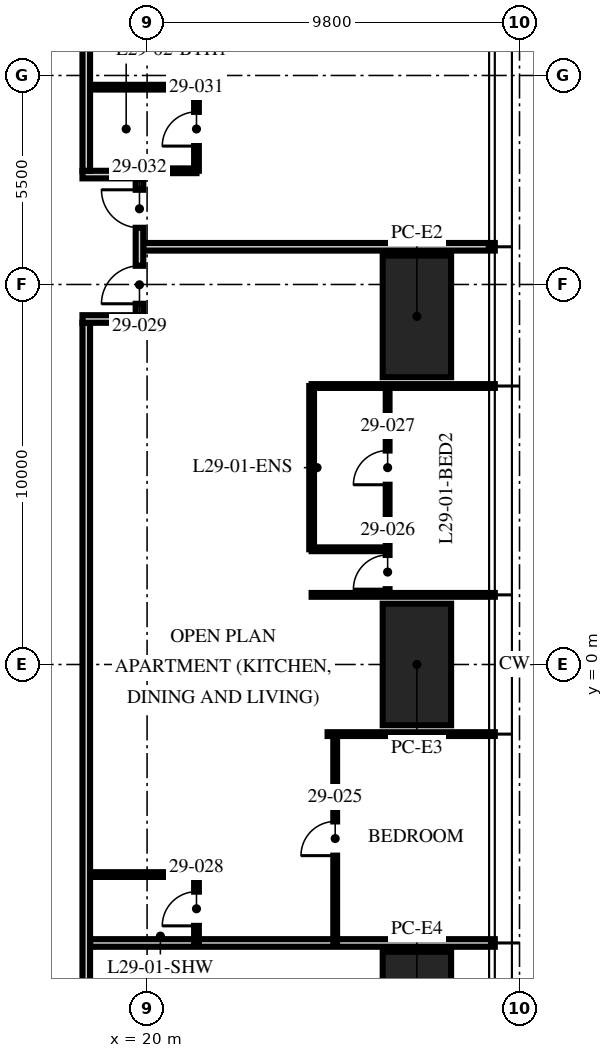
"""IFC4 building model, lengths in metres.
Left out: names, types, materials, properties, quantities, classifications, styles, units other than length and angle.
Written with IfcOpenShell. Run it as: python <this file> out.ifc"""

import sys

from ifc_helpers import new_model, si_unit, direction, frame, frame_2d, origin, origin_2d, place, context, subcontext, project, spatial, rectangle, hollow_rectangle, extrude, element, fill, save


model = new_model("IFC4")
c1 = context("Model", 3, precision=1e-05, world=origin(), true_north=direction((0.0, 1.0)))
c2 = subcontext(c1, "Body", "Model", "MODEL_VIEW")
j1 = project(units=[si_unit("LENGTHUNIT", "METRE"), si_unit("PLANEANGLEUNIT", "RADIAN")], contexts=[c1])
p1 = place(None, origin())
s1 = spatial("IfcSite", under=j1, at=p1, CompositionType="ELEMENT")
p2 = place(p1, origin())
s2 = spatial("IfcBuilding", under=s1, at=p2, CompositionType="ELEMENT")
p3 = place(p2, frame((0.0, 0.0, 118.5)))
s3 = spatial("IfcBuildingStorey", under=s2, at=p3, CompositionType="ELEMENT", Elevation=118.5)
for number, where, z_axis, x_axis in (
    (1, (27.1, 9.16, 0.0), (0.0, 0.0, 1.0), (0.0, 1.0, 0.0)),
    (2, (27.1, 0.0, 0.0), (0.0, 0.0, 1.0), (0.0, 1.0, 0.0)),
    (3, (27.1, -9.16, 0.0), (0.0, 0.0, 1.0), (0.0, 1.0, 0.0)),
):
    element("IfcColumn", number, at=place(p3, frame(where, z_axis=z_axis, x_axis=x_axis)), inside=s3, PredefinedType="COLUMN", context=c2, shape_type="SweptSolid", body=[
        extrude(hollow_rectangle(XDim=3.2, YDim=1.8, WallThickness=0.2, at=origin_2d()), origin(), (0.0, 0.0, 1.0), 3.75),
    ])
p4 = place(p3, frame((18.5, -7.328, 0.0), z_axis=(0.0, 0.0, 1.0), x_axis=(1.0, 0.0, 0.0)))
e4 = element("IfcWall", 4, at=p4, inside=s3, PredefinedType="PARTITIONING", context=c2, shape_type="SweptSolid", body=[
    extrude(rectangle(XDim=10.65, YDim=0.2, at=frame_2d((5.325, 0.0))), origin(), (0.0, 0.0, 1.0), 2.81),
])
p5 = place(p3, frame((24.75, -1.832, 0.0), z_axis=(0.0, 0.0, 1.0), x_axis=(1.0, 0.0, 0.0)))
e5 = element("IfcWall", 5, at=p5, inside=s3, PredefinedType="PARTITIONING", context=c2, shape_type="SweptSolid", body=[
    extrude(rectangle(XDim=4.4, YDim=0.1, at=frame_2d((2.2, 0.0))), origin(), (0.0, 0.0, 1.0), 2.81),
])
for number, where, z_axis, x_axis in (
    (6, (24.33, 1.832, 0.0), (0.0, 0.0, 1.0), (1.0, 0.0, 0.0)),
    (7, (24.33, 7.328, 0.0), (0.0, 0.0, 1.0), (1.0, 0.0, 0.0)),
):
    element("IfcWall", number, at=place(p3, frame(where, z_axis=z_axis, x_axis=x_axis)), inside=s3, PredefinedType="PARTITIONING", context=c2, shape_type="SweptSolid", body=[
        extrude(rectangle(XDim=4.82, YDim=0.1, at=frame_2d((2.41, 0.0))), origin(), (0.0, 0.0, 1.0), 2.81),
    ])
p6 = place(p3, frame((19.9, 10.992, 0.0), z_axis=(0.0, 0.0, 1.0), x_axis=(1.0, 0.0, 0.0)))
e8 = element("IfcWall", 8, at=p6, inside=s3, PredefinedType="PARTITIONING", context=c2, shape_type="SweptSolid", body=[
    extrude(rectangle(XDim=9.25, YDim=0.2, at=frame_2d((4.625, 0.0))), origin(), (0.0, 0.0, 1.0), 2.81),
])
p7 = place(p3, frame((24.95, -7.328, 0.0), z_axis=(0.0, 0.0, 1.0), x_axis=(0.0, 1.0, 0.0)))
e9 = element("IfcWall", 9, at=p7, inside=s3, PredefinedType="PARTITIONING", context=c2, shape_type="SweptSolid", body=[
    extrude(rectangle(XDim=5.496, YDim=0.1, at=frame_2d((2.748, 0.0))), origin(), (0.0, 0.0, 1.0), 2.81),
])
p8 = place(p7, frame((2.298, 0.0, 0.0)))
e10 = element("IfcOpeningElement", 10, at=p8, cuts=e9, PredefinedType="OPENING", context=c2, shape_type="SweptSolid", body=[
    extrude(rectangle(XDim=0.9, YDim=2.1, at=frame_2d((0.45, 1.05))), frame((0.0, 0.06, 0.0), z_axis=(0.0, -1.0, 0.0), x_axis=(1.0, 0.0, 0.0)), (0.0, 0.0, 1.0), 0.12),
])
p9 = place(p3, frame((26.33, 1.832, 0.0), z_axis=(0.0, 0.0, 1.0), x_axis=(0.0, 1.0, 0.0)))
e11 = element("IfcWall", 11, at=p9, inside=s3, PredefinedType="PARTITIONING", context=c2, shape_type="SweptSolid", body=[
    extrude(rectangle(XDim=5.496, YDim=0.1, at=frame_2d((2.748, 0.0))), origin(), (0.0, 0.0, 1.0), 2.81),
])
p10 = place(p9, frame((0.15, 0.0, 0.0)))
e12 = element("IfcOpeningElement", 12, at=p10, cuts=e11, PredefinedType="OPENING", context=c2, shape_type="SweptSolid", body=[
    extrude(rectangle(XDim=0.9, YDim=2.1, at=frame_2d((0.45, 1.05))), frame((0.0, 0.06, 0.0), z_axis=(0.0, -1.0, 0.0), x_axis=(1.0, 0.0, 0.0)), (0.0, 0.0, 1.0), 0.12),
])
p11 = place(p9, frame((2.898, 0.0, 0.0)))
e13 = element("IfcOpeningElement", 13, at=p11, cuts=e11, PredefinedType="OPENING", context=c2, shape_type="SweptSolid", body=[
    extrude(rectangle(XDim=0.9, YDim=2.1, at=frame_2d((0.45, 1.05))), frame((0.0, 0.06, 0.0), z_axis=(0.0, -1.0, 0.0), x_axis=(1.0, 0.0, 0.0)), (0.0, 0.0, 1.0), 0.12),
])
p12 = place(p3, frame((24.33, 3.032, 0.0), z_axis=(0.0, 0.0, 1.0), x_axis=(1.0, 0.0, 0.0)))
e14 = element("IfcWall", 14, at=p12, inside=s3, PredefinedType="PARTITIONING", context=c2, shape_type="SweptSolid", body=[
    extrude(rectangle(XDim=2.0, YDim=0.1, at=frame_2d((1.0, 0.0))), origin(), (0.0, 0.0, 1.0), 3.5),
])
p13 = place(p3, frame((24.33, 3.032, 0.0), z_axis=(0.0, 0.0, 1.0), x_axis=(0.0, 1.0, 0.0)))
e15 = element("IfcWall", 15, at=p13, inside=s3, PredefinedType="PARTITIONING", context=c2, shape_type="SweptSolid", body=[
    extrude(rectangle(XDim=4.296, YDim=0.125, at=frame_2d((2.148, 0.0))), origin(), (0.0, 0.0, 1.0), 2.81),
])
p14 = place(p3, frame((21.3, -7.328, 0.0), z_axis=(0.0, 0.0, 1.0), x_axis=(0.0, 1.0, 0.0)))
e16 = element("IfcWall", 16, at=p14, inside=s3, PredefinedType="PARTITIONING", context=c2, shape_type="SweptSolid", body=[
    extrude(rectangle(XDim=1.8, YDim=0.125, at=frame_2d((0.9, 0.0))), origin(), (0.0, 0.0, 1.0), 3.5),
])
p15 = place(p14, frame((0.45, 0.0, 0.0)))
e17 = element("IfcOpeningElement", 17, at=p15, cuts=e16, PredefinedType="OPENING", context=c2, shape_type="SweptSolid", body=[
    extrude(rectangle(XDim=0.9, YDim=2.1, at=frame_2d((0.45, 1.05))), frame((0.0, 0.073, 0.0), z_axis=(0.0, -1.0, 0.0), x_axis=(1.0, 0.0, 0.0)), (0.0, 0.0, 1.0), 0.145),
])
p16 = place(p3, frame((18.5, -5.528, 0.0), z_axis=(0.0, 0.0, 1.0), x_axis=(1.0, 0.0, 0.0)))
e18 = element("IfcWall", 18, at=p16, inside=s3, PredefinedType="PARTITIONING", context=c2, shape_type="SweptSolid", body=[
    extrude(rectangle(XDim=2.8, YDim=0.125, at=frame_2d((1.4, 0.0))), origin(), (0.0, 0.0, 1.0), 3.5),
])
p17 = place(p3, frame((21.3, 12.992, 0.0), z_axis=(0.0, 0.0, 1.0), x_axis=(0.0, 1.0, 0.0)))
e19 = element("IfcWall", 19, at=p17, inside=s3, PredefinedType="PARTITIONING", context=c2, shape_type="SweptSolid", body=[
    extrude(rectangle(XDim=2.2, YDim=0.125, at=frame_2d((1.1, 0.0))), origin(), (0.0, 0.0, 1.0), 2.81),
])
p18 = place(p17, frame((0.65, 0.0, 0.0)))
e20 = element("IfcOpeningElement", 20, at=p18, cuts=e19, PredefinedType="OPENING", context=c2, shape_type="SweptSolid", body=[
    extrude(rectangle(XDim=0.9, YDim=2.1, at=frame_2d((0.45, 1.05))), frame((0.0, 0.073, 0.0), z_axis=(0.0, -1.0, 0.0), x_axis=(1.0, 0.0, 0.0)), (0.0, 0.0, 1.0), 0.145),
])
p19 = place(p3, frame((19.97, 12.992, 0.0), z_axis=(0.0, 0.0, 1.0), x_axis=(1.0, 0.0, 0.0)))
e21 = element("IfcWall", 21, at=p19, inside=s3, PredefinedType="PARTITIONING", context=c2, shape_type="SweptSolid", body=[
    extrude(rectangle(XDim=1.33, YDim=0.125, at=frame_2d((0.665, 0.0))), origin(), (0.0, 0.0, 1.0), 3.5),
])
p20 = place(p3, frame((18.5, 15.192, 0.0), z_axis=(0.0, 0.0, 1.0), x_axis=(1.0, 0.0, 0.0)))
e22 = element("IfcWall", 22, at=p20, inside=s3, PredefinedType="PARTITIONING", context=c2, shape_type="SweptSolid", body=[
    extrude(rectangle(XDim=2.8, YDim=0.125, at=frame_2d((1.4, 0.0))), origin(), (0.0, 0.0, 1.0), 3.5),
])
p21 = place(p3, frame((18.4, -18.3, 0.0), z_axis=(0.0, 0.0, 1.0), x_axis=(0.0, 1.0, 0.0)))
e23 = element("IfcWall", 23, at=p21, inside=s3, PredefinedType="PARTITIONING", context=c2, shape_type="SweptSolid", body=[
    extrude(rectangle(XDim=27.292, YDim=0.2, at=frame_2d((13.646, 0.0))), origin(), (0.0, 0.0, 1.0), 2.3),
])
p22 = place(p3, frame((18.3, 9.092, 0.0), z_axis=(0.0, 0.0, 1.0), x_axis=(1.0, 0.0, 0.0)))
e24 = element("IfcWall", 24, at=p22, inside=s3, PredefinedType="PARTITIONING", context=c2, shape_type="SweptSolid", body=[
    extrude(rectangle(XDim=1.6, YDim=0.2, at=frame_2d((0.8, 0.0))), origin(), (0.0, 0.0, 1.0), 2.7),
])
p23 = place(p3, frame((18.3, 12.892, 0.0), z_axis=(0.0, 0.0, 1.0), x_axis=(1.0, 0.0, 0.0)))
e25 = element("IfcWall", 25, at=p23, inside=s3, PredefinedType="PARTITIONING", context=c2, shape_type="SweptSolid", body=[
    extrude(rectangle(XDim=1.6, YDim=0.2, at=frame_2d((0.8, 0.0))), origin(), (0.0, 0.0, 1.0), 3.5),
])
p24 = place(p3, frame((19.8, 9.192, 0.0), z_axis=(0.0, 0.0, 1.0), x_axis=(0.0, 1.0, 0.0)))
e26 = element("IfcWall", 26, at=p24, inside=s3, PredefinedType="PARTITIONING", context=c2, shape_type="SweptSolid", body=[
    extrude(rectangle(XDim=3.6, YDim=0.2, at=frame_2d((1.8, 0.0))), origin(), (0.0, 0.0, 1.0), 2.7),
])
p25 = place(p24, frame((0.3, 0.0, 0.0)))
e27 = element("IfcOpeningElement", 27, at=p25, cuts=e26, PredefinedType="OPENING", context=c2, shape_type="SweptSolid", body=[
    extrude(rectangle(XDim=1.0, YDim=2.2, at=frame_2d((0.5, 1.1))), frame((0.0, 0.11, 0.0), z_axis=(0.0, -1.0, 0.0), x_axis=(1.0, 0.0, 0.0)), (0.0, 0.0, 1.0), 0.22),
])
p26 = place(p24, frame((2.3, 0.0, 0.0)))
e28 = element("IfcOpeningElement", 28, at=p26, cuts=e26, PredefinedType="OPENING", context=c2, shape_type="SweptSolid", body=[
    extrude(rectangle(XDim=1.0, YDim=2.2, at=frame_2d((0.5, 1.1))), frame((0.0, 0.11, 0.0), z_axis=(0.0, -1.0, 0.0), x_axis=(1.0, 0.0, 0.0)), (0.0, 0.0, 1.0), 0.22),
])
p27 = place(p3, frame((18.4, 12.992, 0.0), z_axis=(0.0, 0.0, 1.0), x_axis=(0.0, 1.0, 0.0)))
e29 = element("IfcWall", 29, at=p27, inside=s3, PredefinedType="PARTITIONING", context=c2, shape_type="SweptSolid", body=[
    extrude(rectangle(XDim=3.708, YDim=0.2, at=frame_2d((1.854, 0.0))), origin(), (0.0, 0.0, 1.0), 2.81),
])
p28 = place(p8, origin())
e30 = element("IfcDoor", 30, at=p28, inside=s3, OperationType="SINGLE_SWING_LEFT", PredefinedType="DOOR", context=c2, shape_type="SweptSolid", body=[
    extrude(rectangle(XDim=0.9, YDim=2.1, at=frame_2d((0.45, 1.05))), frame((0.0, 0.025, 0.0), z_axis=(0.0, -1.0, 0.0), x_axis=(1.0, 0.0, 0.0)), (0.0, 0.0, 1.0), 0.05),
])
fill(e10, e30)
p29 = place(p10, origin())
e31 = element("IfcDoor", 31, at=p29, inside=s3, OperationType="SINGLE_SWING_LEFT", PredefinedType="DOOR", context=c2, shape_type="SweptSolid", body=[
    extrude(rectangle(XDim=0.9, YDim=2.1, at=frame_2d((0.45, 1.05))), frame((0.0, 0.025, 0.0), z_axis=(0.0, -1.0, 0.0), x_axis=(1.0, 0.0, 0.0)), (0.0, 0.0, 1.0), 0.05),
])
fill(e12, e31)
p30 = place(p11, origin())
e32 = element("IfcDoor", 32, at=p30, inside=s3, OperationType="SINGLE_SWING_LEFT", PredefinedType="DOOR", context=c2, shape_type="SweptSolid", body=[
    extrude(rectangle(XDim=0.9, YDim=2.1, at=frame_2d((0.45, 1.05))), frame((0.0, 0.025, 0.0), z_axis=(0.0, -1.0, 0.0), x_axis=(1.0, 0.0, 0.0)), (0.0, 0.0, 1.0), 0.05),
])
fill(e13, e32)
p31 = place(p15, origin())
e33 = element("IfcDoor", 33, at=p31, inside=s3, OperationType="SINGLE_SWING_LEFT", PredefinedType="DOOR", context=c2, shape_type="SweptSolid", body=[
    extrude(rectangle(XDim=0.9, YDim=2.1, at=frame_2d((0.45, 1.05))), frame((0.0, 0.025, 0.0), z_axis=(0.0, -1.0, 0.0), x_axis=(1.0, 0.0, 0.0)), (0.0, 0.0, 1.0), 0.05),
])
fill(e17, e33)
p32 = place(p25, origin())
e34 = element("IfcDoor", 34, at=p32, inside=s3, OperationType="SINGLE_SWING_LEFT", PredefinedType="DOOR", context=c2, shape_type="SweptSolid", body=[
    extrude(rectangle(XDim=1.0, YDim=2.2, at=frame_2d((0.5, 1.1))), frame((0.0, 0.025, 0.0), z_axis=(0.0, -1.0, 0.0), x_axis=(1.0, 0.0, 0.0)), (0.0, 0.0, 1.0), 0.05),
])
fill(e27, e34)
p33 = place(p18, origin())
e35 = element("IfcDoor", 35, at=p33, inside=s3, OperationType="SINGLE_SWING_LEFT", PredefinedType="DOOR", context=c2, shape_type="SweptSolid", body=[
    extrude(rectangle(XDim=0.9, YDim=2.1, at=frame_2d((0.45, 1.05))), frame((0.0, 0.025, 0.0), z_axis=(0.0, -1.0, 0.0), x_axis=(1.0, 0.0, 0.0)), (0.0, 0.0, 1.0), 0.05),
])
fill(e20, e35)
p34 = place(p26, origin())
e36 = element("IfcDoor", 36, at=p34, inside=s3, OperationType="SINGLE_SWING_RIGHT", PredefinedType="DOOR", context=c2, shape_type="SweptSolid", body=[
    extrude(rectangle(XDim=1.0, YDim=2.2, at=frame_2d((0.5, 1.1))), frame((0.0, 0.025, 0.0), z_axis=(0.0, -1.0, 0.0), x_axis=(1.0, 0.0, 0.0)), (0.0, 0.0, 1.0), 0.05),
])
fill(e28, e36)
save(model, sys.argv[1])
